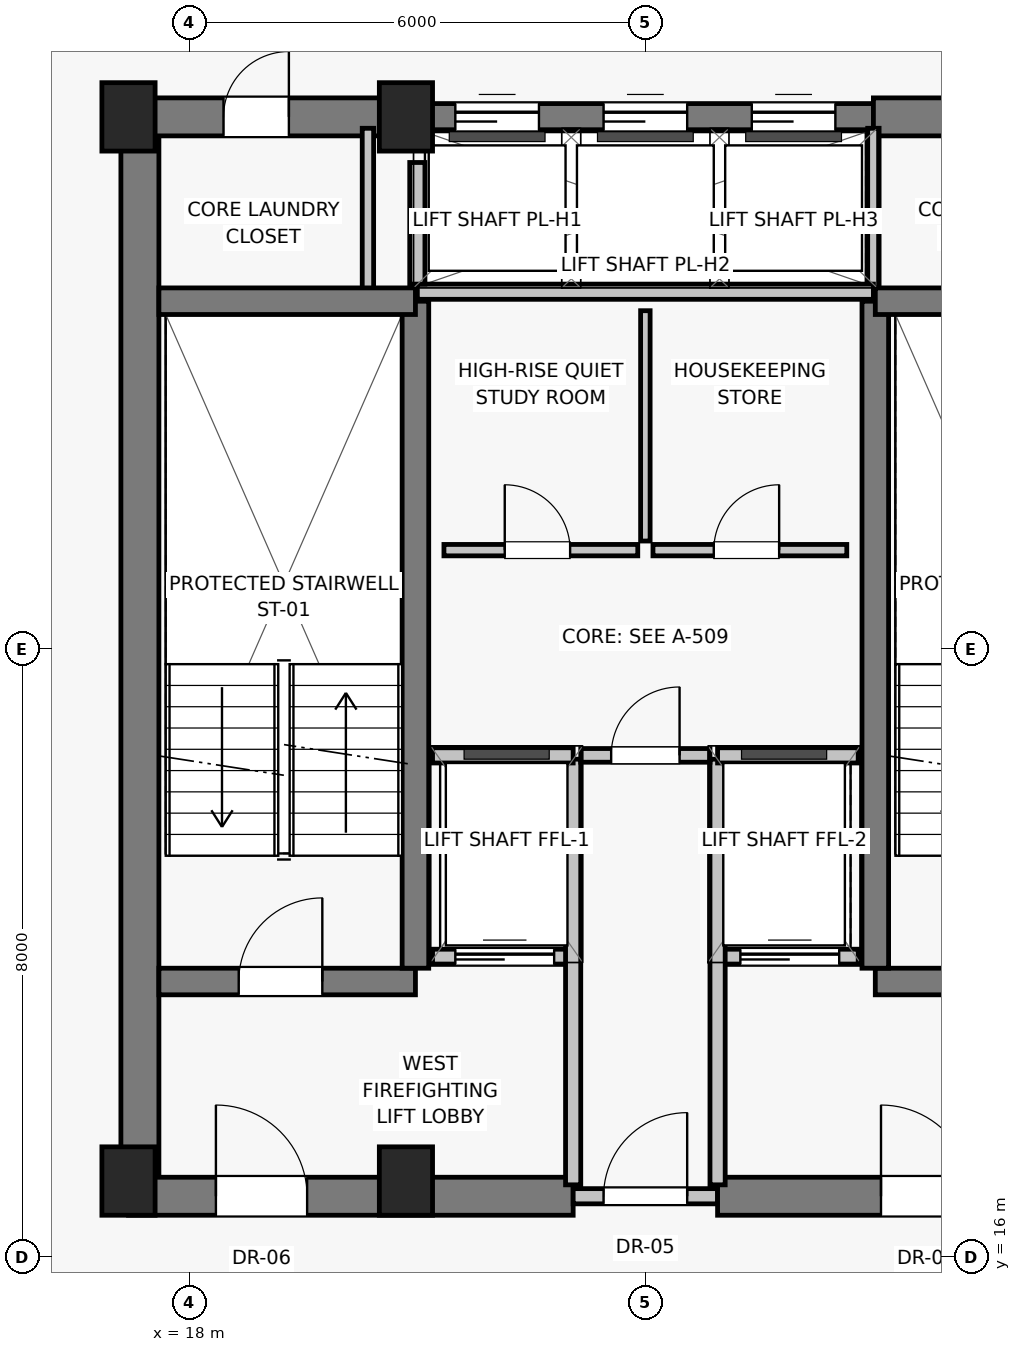
"""IFC4 building model, lengths in metres.
Left out: names, types, materials, properties, quantities, classifications, styles, units other than length and angle.
Written with IfcOpenShell. Run it as: python <this file> out.ifc"""

import sys

from ifc_helpers import new_model, si_unit, direction, frame, frame_2d, origin, origin_2d, place, context, subcontext, project, spatial, rectangle, extrude, source, transform, mapped, element, fill, save


model = new_model("IFC4")
c1 = context("Model", 3, precision=1e-05, world=origin(), true_north=direction((0.0, 1.0)))
c2 = subcontext(c1, "Body", "Model", "MODEL_VIEW")
j1 = project(units=[si_unit("LENGTHUNIT", "METRE"), si_unit("PLANEANGLEUNIT", "RADIAN")], contexts=[c1])
p1 = place(None, origin())
s1 = spatial("IfcSite", under=j1, at=p1, CompositionType="ELEMENT")
p2 = place(p1, origin())
s2 = spatial("IfcBuilding", under=s1, at=p2, CompositionType="ELEMENT")
p3 = place(p2, frame((0.0, 0.0, 215.65)))
s3 = spatial("IfcBuildingStorey", under=s2, at=p3, CompositionType="ELEMENT", Elevation=215.65)
for number, where, z_axis, x_axis in (
    (1, (17.2, 17.0, 0.0), (0.0, 0.0, 1.0), (1.0, 0.0, 0.0)),
    (2, (20.85, 17.0, 0.0), (0.0, 0.0, 1.0), (1.0, 0.0, 0.0)),
    (3, (17.2, 31.0, 0.0), (0.0, 0.0, 1.0), (1.0, 0.0, 0.0)),
    (4, (20.85, 31.0, 0.0), (0.0, 0.0, 1.0), (1.0, 0.0, 0.0)),
):
    element("IfcColumn", number, at=place(p3, frame(where, z_axis=z_axis, x_axis=x_axis)), inside=s3, PredefinedType="PILASTER", context=c2, shape_type="SweptSolid", body=[
        extrude(rectangle(XDim=0.7, YDim=0.9, at=origin_2d()), origin(), (0.0, 0.0, 1.0), 3.25),
    ])
p4 = place(p3, frame((17.35, 16.8, 0.0), z_axis=(0.0, 0.0, 1.0), x_axis=(0.0, 1.0, 0.0)))
e5 = element("IfcWall", 5, at=p4, inside=s3, PredefinedType="SHEAR", context=c2, shape_type="SweptSolid", body=[
    extrude(rectangle(XDim=14.2, YDim=0.5, at=frame_2d((7.1, 0.0))), origin(), (0.0, 0.0, 1.0), 3.015),
])
p5 = place(p3, frame((17.2, 16.8, 0.0), z_axis=(0.0, 0.0, 1.0), x_axis=(1.0, 0.0, 0.0)))
e6 = element("IfcWall", 6, at=p5, inside=s3, PredefinedType="SHEAR", context=c2, shape_type="SweptSolid", body=[
    extrude(rectangle(XDim=5.85, YDim=0.5, at=frame_2d((2.925, 0.0))), origin(), (0.0, 0.0, 1.0), 3.015),
])
p6 = place(p5, frame((1.15, 0.0, 0.0)))
e7 = element("IfcOpeningElement", 7, at=p6, cuts=e6, PredefinedType="OPENING", context=c2, shape_type="SweptSolid", body=[
    extrude(rectangle(XDim=1.2, YDim=2.03, at=frame_2d((0.6, 1.015))), frame((0.0, 0.26, 0.0), z_axis=(0.0, -1.0, 0.0), x_axis=(1.0, 0.0, 0.0)), (0.0, 0.0, 1.0), 0.52),
])
p7 = place(p3, frame((23.05, 16.8, 0.0), z_axis=(0.0, 0.0, 1.0), x_axis=(1.0, 0.0, 0.0)))
e8 = element("IfcWall", 8, at=p7, inside=s3, PredefinedType="SOLIDWALL", context=c2, shape_type="SweptSolid", body=[
    extrude(rectangle(XDim=1.9, YDim=0.2, at=frame_2d((0.95, 0.0))), origin(), (0.0, 0.0, 1.0), 2.165),
])
p8 = place(p7, frame((0.4, 0.0, 0.0)))
e9 = element("IfcOpeningElement", 9, at=p8, cuts=e8, PredefinedType="OPENING", context=c2, shape_type="SweptSolid", body=[
    extrude(rectangle(XDim=1.1, YDim=2.03, at=frame_2d((0.55, 1.015))), frame((0.0, 0.11, 0.0), z_axis=(0.0, -1.0, 0.0), x_axis=(1.0, 0.0, 0.0)), (0.0, 0.0, 1.0), 0.22),
])
p9 = place(p3, frame((24.95, 16.8, 0.0), z_axis=(0.0, 0.0, 1.0), x_axis=(1.0, 0.0, 0.0)))
e10 = element("IfcWall", 10, at=p9, inside=s3, PredefinedType="SHEAR", context=c2, shape_type="SweptSolid", body=[
    extrude(rectangle(XDim=5.85, YDim=0.5, at=frame_2d((2.925, 0.0))), origin(), (0.0, 0.0, 1.0), 3.015),
])
p10 = place(p9, frame((2.15, 0.0, 0.0)))
e11 = element("IfcOpeningElement", 11, at=p10, cuts=e10, PredefinedType="OPENING", context=c2, shape_type="SweptSolid", body=[
    extrude(rectangle(XDim=1.2, YDim=2.03, at=frame_2d((0.6, 1.015))), frame((0.0, 0.26, 0.0), z_axis=(0.0, -1.0, 0.0), x_axis=(1.0, 0.0, 0.0)), (0.0, 0.0, 1.0), 0.52),
])
p11 = place(p3, frame((17.2, 31.0, 0.0), z_axis=(0.0, 0.0, 1.0), x_axis=(1.0, 0.0, 0.0)))
e12 = element("IfcWall", 12, at=p11, inside=s3, PredefinedType="SHEAR", context=c2, shape_type="SweptSolid", body=[
    extrude(rectangle(XDim=3.8, YDim=0.5, at=frame_2d((1.9, 0.0))), origin(), (0.0, 0.0, 1.0), 3.015),
])
p12 = place(p11, frame((1.25, 0.0, 0.0)))
e13 = element("IfcOpeningElement", 13, at=p12, cuts=e12, PredefinedType="OPENING", context=c2, shape_type="SweptSolid", body=[
    extrude(rectangle(XDim=0.86, YDim=2.01, at=frame_2d((0.43, 1.005))), frame((0.0, 0.26, 0.0), z_axis=(0.0, -1.0, 0.0), x_axis=(1.0, 0.0, 0.0)), (0.0, 0.0, 1.0), 0.52),
])
p13 = place(p3, frame((21.0, 31.0, 0.0), z_axis=(0.0, 0.0, 1.0), x_axis=(1.0, 0.0, 0.0)))
e14 = element("IfcWall", 14, at=p13, inside=s3, PredefinedType="SHEAR", context=c2, shape_type="SweptSolid", body=[
    extrude(rectangle(XDim=6.0, YDim=0.35, at=frame_2d((3.0, 0.0))), origin(), (0.0, 0.0, 1.0), 3.015),
])
p14 = place(p13, frame((0.5, 0.0, 0.0)))
e15 = element("IfcOpeningElement", 15, at=p14, cuts=e14, PredefinedType="OPENING", context=c2, shape_type="SweptSolid", body=[
    extrude(rectangle(XDim=1.1, YDim=2.08, at=frame_2d((0.55, 1.04))), frame((0.0, 0.185, 0.0), z_axis=(0.0, -1.0, 0.0), x_axis=(1.0, 0.0, 0.0)), (0.0, 0.0, 1.0), 0.37),
])
p15 = place(p13, frame((2.45, 0.0, 0.0)))
e16 = element("IfcOpeningElement", 16, at=p15, cuts=e14, PredefinedType="OPENING", context=c2, shape_type="SweptSolid", body=[
    extrude(rectangle(XDim=1.1, YDim=2.08, at=frame_2d((0.55, 1.04))), frame((0.0, 0.185, 0.0), z_axis=(0.0, -1.0, 0.0), x_axis=(1.0, 0.0, 0.0)), (0.0, 0.0, 1.0), 0.37),
])
p16 = place(p13, frame((4.4, 0.0, 0.0)))
e17 = element("IfcOpeningElement", 17, at=p16, cuts=e14, PredefinedType="OPENING", context=c2, shape_type="SweptSolid", body=[
    extrude(rectangle(XDim=1.1, YDim=2.08, at=frame_2d((0.55, 1.04))), frame((0.0, 0.185, 0.0), z_axis=(0.0, -1.0, 0.0), x_axis=(1.0, 0.0, 0.0)), (0.0, 0.0, 1.0), 0.37),
])
p17 = place(p3, frame((27.0, 31.0, 0.0), z_axis=(0.0, 0.0, 1.0), x_axis=(1.0, 0.0, 0.0)))
e18 = element("IfcWall", 18, at=p17, inside=s3, PredefinedType="SHEAR", context=c2, shape_type="SweptSolid", body=[
    extrude(rectangle(XDim=3.8, YDim=0.5, at=frame_2d((1.9, 0.0))), origin(), (0.0, 0.0, 1.0), 3.015),
])
p18 = place(p17, frame((1.15, 0.0, 0.0)))
e19 = element("IfcOpeningElement", 19, at=p18, cuts=e18, PredefinedType="OPENING", context=c2, shape_type="SweptSolid", body=[
    extrude(rectangle(XDim=1.0, YDim=2.01, at=frame_2d((0.5, 1.005))), frame((0.0, 0.26, 0.0), z_axis=(0.0, -1.0, 0.0), x_axis=(1.0, 0.0, 0.0)), (0.0, 0.0, 1.0), 0.52),
])
for number, where, z_axis, x_axis in (
    (20, (20.35, 28.65, 0.0), (0.0, 0.0, 1.0), (0.0, 1.0, 0.0)),
    (21, (27.0, 28.65, 0.0), (0.0, 0.0, 1.0), (0.0, 1.0, 0.0)),
):
    element("IfcWall", number, at=place(p3, frame(where, z_axis=z_axis, x_axis=x_axis)), inside=s3, PredefinedType="PARTITIONING", context=c2, shape_type="SweptSolid", body=[
        extrude(rectangle(XDim=2.2, YDim=0.15, at=frame_2d((1.1, 0.0))), origin(), (0.0, 0.0, 1.0), 3.015),
    ])
p19 = place(p3, frame((17.6, 19.625, 0.0), z_axis=(0.0, 0.0, 1.0), x_axis=(1.0, 0.0, 0.0)))
e22 = element("IfcWall", 22, at=p19, inside=s3, PredefinedType="SHEAR", context=c2, shape_type="SweptSolid", body=[
    extrude(rectangle(XDim=3.375, YDim=0.35, at=frame_2d((1.688, 0.0))), origin(), (0.0, 0.0, 1.0), 3.015),
])
p20 = place(p19, frame((1.05, 0.0, 0.0)))
e23 = element("IfcOpeningElement", 23, at=p20, cuts=e22, PredefinedType="OPENING", context=c2, shape_type="SweptSolid", body=[
    extrude(rectangle(XDim=1.1, YDim=2.03, at=frame_2d((0.55, 1.015))), frame((0.0, 0.185, 0.0), z_axis=(0.0, -1.0, 0.0), x_axis=(1.0, 0.0, 0.0)), (0.0, 0.0, 1.0), 0.37),
])
p21 = place(p3, frame((21.2, 19.95, 0.0), z_axis=(0.0, 0.0, 1.0), x_axis=(1.0, 0.0, 0.0)))
e24 = element("IfcWall", 24, at=p21, inside=s3, PredefinedType="SOLIDWALL", context=c2, shape_type="SweptSolid", body=[
    extrude(rectangle(XDim=1.85, YDim=0.2, at=frame_2d((0.925, 0.0))), origin(), (0.0, 0.0, 1.0), 3.015),
])
p22 = place(p21, frame((0.3, 0.0, 0.0)))
e25 = element("IfcOpeningElement", 25, at=p22, cuts=e24, PredefinedType="OPENING", context=c2, shape_type="SweptSolid", body=[
    extrude(rectangle(XDim=1.3, YDim=2.25, at=frame_2d((0.65, 1.125))), frame((0.0, 0.11, 0.0), z_axis=(0.0, -1.0, 0.0), x_axis=(1.0, 0.0, 0.0)), (0.0, 0.0, 1.0), 0.22),
])
p23 = place(p3, frame((24.95, 19.95, 0.0), z_axis=(0.0, 0.0, 1.0), x_axis=(1.0, 0.0, 0.0)))
e26 = element("IfcWall", 26, at=p23, inside=s3, PredefinedType="SOLIDWALL", context=c2, shape_type="SweptSolid", body=[
    extrude(rectangle(XDim=1.85, YDim=0.2, at=frame_2d((0.925, 0.0))), origin(), (0.0, 0.0, 1.0), 3.015),
])
p24 = place(p23, frame((0.3, 0.0, 0.0)))
e27 = element("IfcOpeningElement", 27, at=p24, cuts=e26, PredefinedType="OPENING", context=c2, shape_type="SweptSolid", body=[
    extrude(rectangle(XDim=1.3, YDim=2.25, at=frame_2d((0.65, 1.125))), frame((0.0, 0.11, 0.0), z_axis=(0.0, -1.0, 0.0), x_axis=(1.0, 0.0, 0.0)), (0.0, 0.0, 1.0), 0.22),
])
p25 = place(p3, frame((27.025, 19.625, 0.0), z_axis=(0.0, 0.0, 1.0), x_axis=(1.0, 0.0, 0.0)))
e28 = element("IfcWall", 28, at=p25, inside=s3, PredefinedType="SHEAR", context=c2, shape_type="SweptSolid", body=[
    extrude(rectangle(XDim=3.375, YDim=0.35, at=frame_2d((1.688, 0.0))), origin(), (0.0, 0.0, 1.0), 3.015),
])
p26 = place(p25, frame((1.05, 0.0, 0.0)))
e29 = element("IfcOpeningElement", 29, at=p26, cuts=e28, PredefinedType="OPENING", context=c2, shape_type="SweptSolid", body=[
    extrude(rectangle(XDim=1.1, YDim=2.03, at=frame_2d((0.55, 1.015))), frame((0.0, 0.185, 0.0), z_axis=(0.0, -1.0, 0.0), x_axis=(1.0, 0.0, 0.0)), (0.0, 0.0, 1.0), 0.37),
])
for number, where, z_axis, x_axis in (
    (30, (20.975, 19.8, 0.0), (0.0, 0.0, 1.0), (0.0, 1.0, 0.0)),
    (31, (27.025, 19.8, 0.0), (0.0, 0.0, 1.0), (0.0, 1.0, 0.0)),
):
    element("IfcWall", number, at=place(p3, frame(where, z_axis=z_axis, x_axis=x_axis)), inside=s3, PredefinedType="SHEAR", context=c2, shape_type="SweptSolid", body=[
        extrude(rectangle(XDim=8.775, YDim=0.35, at=frame_2d((4.387, 0.0))), origin(), (0.0, 0.0, 1.0), 3.015),
    ])
for number, where, z_axis, x_axis in (
    (32, (17.6, 28.575, 0.0), (0.0, 0.0, 1.0), (1.0, 0.0, 0.0)),
    (33, (27.025, 28.575, 0.0), (0.0, 0.0, 1.0), (1.0, 0.0, 0.0)),
):
    element("IfcWall", number, at=place(p3, frame(where, z_axis=z_axis, x_axis=x_axis)), inside=s3, PredefinedType="SHEAR", context=c2, shape_type="SweptSolid", body=[
        extrude(rectangle(XDim=3.375, YDim=0.35, at=frame_2d((1.688, 0.0))), origin(), (0.0, 0.0, 1.0), 3.015),
    ])
for number, where, z_axis, x_axis in (
    (34, (23.05, 16.95, 0.0), (0.0, 0.0, 1.0), (0.0, 1.0, 0.0)),
    (35, (24.95, 16.95, 0.0), (0.0, 0.0, 1.0), (0.0, 1.0, 0.0)),
):
    element("IfcWall", number, at=place(p3, frame(where, z_axis=z_axis, x_axis=x_axis)), inside=s3, PredefinedType="SOLIDWALL", context=c2, shape_type="SweptSolid", body=[
        extrude(rectangle(XDim=5.6, YDim=0.2, at=frame_2d((2.8, 0.0))), origin(), (0.0, 0.0, 1.0), 3.015),
    ])
for number, where, z_axis, x_axis in (
    (36, (21.2, 22.6, 0.0), (0.0, 0.0, 1.0), (1.0, 0.0, 0.0)),
    (37, (24.95, 22.6, 0.0), (0.0, 0.0, 1.0), (1.0, 0.0, 0.0)),
):
    element("IfcWall", number, at=place(p3, frame(where, z_axis=z_axis, x_axis=x_axis)), inside=s3, PredefinedType="SOLIDWALL", context=c2, shape_type="SweptSolid", body=[
        extrude(rectangle(XDim=1.85, YDim=0.2, at=frame_2d((0.925, 0.0))), origin(), (0.0, 0.0, 1.0), 3.015),
    ])
p27 = place(p3, frame((21.0, 28.7, 0.0), z_axis=(0.0, 0.0, 1.0), x_axis=(1.0, 0.0, 0.0)))
e38 = element("IfcWall", 38, at=p27, inside=s3, PredefinedType="SOLIDWALL", context=c2, shape_type="SweptSolid", body=[
    extrude(rectangle(XDim=6.0, YDim=0.2, at=frame_2d((3.0, 0.0))), origin(), (0.0, 0.0, 1.0), 3.015),
])
p28 = place(p3, frame((21.0, 28.8, 0.0), z_axis=(0.0, 0.0, 1.0), x_axis=(0.0, 1.0, 0.0)))
e39 = element("IfcWall", 39, at=p28, inside=s3, PredefinedType="SOLIDWALL", context=c2, shape_type="SweptSolid", body=[
    extrude(rectangle(XDim=1.6, YDim=0.2, at=frame_2d((0.8, 0.0))), origin(), (0.0, 0.0, 1.0), 3.015),
])
p29 = place(p3, frame((23.15, 22.6, 0.0), z_axis=(0.0, 0.0, 1.0), x_axis=(1.0, 0.0, 0.0)))
e40 = element("IfcWall", 40, at=p29, inside=s3, PredefinedType="PARTITIONING", context=c2, shape_type="SweptSolid", body=[
    extrude(rectangle(XDim=1.7, YDim=0.18, at=frame_2d((0.85, 0.0))), origin(), (0.0, 0.0, 1.0), 3.015),
])
p30 = place(p29, frame((0.4, 0.0, 0.0)))
e41 = element("IfcOpeningElement", 41, at=p30, cuts=e40, PredefinedType="OPENING", context=c2, shape_type="SweptSolid", body=[
    extrude(rectangle(XDim=0.9, YDim=2.01, at=frame_2d((0.45, 1.005))), frame((0.0, 0.1, 0.0), z_axis=(0.0, -1.0, 0.0), x_axis=(1.0, 0.0, 0.0)), (0.0, 0.0, 1.0), 0.2),
])
p31 = place(p3, frame((21.35, 25.3, 0.0), z_axis=(0.0, 0.0, 1.0), x_axis=(1.0, 0.0, 0.0)))
e42 = element("IfcWall", 42, at=p31, inside=s3, PredefinedType="PARTITIONING", context=c2, shape_type="SweptSolid", body=[
    extrude(rectangle(XDim=2.55, YDim=0.15, at=frame_2d((1.275, 0.0))), origin(), (0.0, 0.0, 1.0), 3.015),
])
p32 = place(p31, frame((0.8, 0.0, 0.0)))
e43 = element("IfcOpeningElement", 43, at=p32, cuts=e42, PredefinedType="OPENING", context=c2, shape_type="SweptSolid", body=[
    extrude(rectangle(XDim=0.86, YDim=2.01, at=frame_2d((0.43, 1.005))), frame((0.0, 0.085, 0.0), z_axis=(0.0, -1.0, 0.0), x_axis=(1.0, 0.0, 0.0)), (0.0, 0.0, 1.0), 0.17),
])
p33 = place(p3, frame((24.1, 25.3, 0.0), z_axis=(0.0, 0.0, 1.0), x_axis=(1.0, 0.0, 0.0)))
e44 = element("IfcWall", 44, at=p33, inside=s3, PredefinedType="PARTITIONING", context=c2, shape_type="SweptSolid", body=[
    extrude(rectangle(XDim=2.55, YDim=0.15, at=frame_2d((1.275, 0.0))), origin(), (0.0, 0.0, 1.0), 3.015),
])
p34 = place(p33, frame((0.8, 0.0, 0.0)))
e45 = element("IfcOpeningElement", 45, at=p34, cuts=e44, PredefinedType="OPENING", context=c2, shape_type="SweptSolid", body=[
    extrude(rectangle(XDim=0.86, YDim=2.01, at=frame_2d((0.43, 1.005))), frame((0.0, 0.085, 0.0), z_axis=(0.0, -1.0, 0.0), x_axis=(1.0, 0.0, 0.0)), (0.0, 0.0, 1.0), 0.17),
])
p35 = place(p3, frame((24.0, 25.42, 0.0), z_axis=(0.0, 0.0, 1.0), x_axis=(0.0, 1.0, 0.0)))
e46 = element("IfcWall", 46, at=p35, inside=s3, PredefinedType="PARTITIONING", context=c2, shape_type="SweptSolid", body=[
    extrude(rectangle(XDim=3.03, YDim=0.125, at=frame_2d((1.515, 0.0))), origin(), (0.0, 0.0, 1.0), 3.015),
])
m1 = source(origin(), c2, "Body", "SweptSolid", [
    extrude(rectangle(XDim=1.2, YDim=2.03, at=frame_2d((0.6, 1.015))), frame((0.0, 0.025, 0.0), z_axis=(0.0, -1.0, 0.0), x_axis=(1.0, 0.0, 0.0)), (0.0, 0.0, 1.0), 0.05),
])
p36 = place(p6, origin())
e47 = element("IfcDoor", 47, at=p36, inside=s3, OperationType="SINGLE_SWING_LEFT", PredefinedType="DOOR", context=c2, shape_type="MappedRepresentation", body=[
    mapped(m1, transform((0.0, 0.0, 0.0), scale=1.0)),
])
fill(e7, e47)
m2 = source(origin(), c2, "Body", "SweptSolid", [
    extrude(rectangle(XDim=1.1, YDim=2.03, at=frame_2d((0.55, 1.015))), frame((0.0, 0.025, 0.0), z_axis=(0.0, -1.0, 0.0), x_axis=(1.0, 0.0, 0.0)), (0.0, 0.0, 1.0), 0.05),
])
p37 = place(p8, origin())
e48 = element("IfcDoor", 48, at=p37, inside=s3, OperationType="SINGLE_SWING_RIGHT", PredefinedType="DOOR", context=c2, shape_type="MappedRepresentation", body=[
    mapped(m2, transform((0.0, 0.0, 0.0), scale=1.0)),
])
fill(e9, e48)
p38 = place(p10, origin())
e49 = element("IfcDoor", 49, at=p38, inside=s3, OperationType="SINGLE_SWING_LEFT", PredefinedType="DOOR", context=c2, shape_type="MappedRepresentation", body=[
    mapped(m1, transform((0.0, 0.0, 0.0), scale=1.0)),
])
fill(e11, e49)
m3 = source(origin(), c2, "Body", "SweptSolid", [
    extrude(rectangle(XDim=0.86, YDim=2.01, at=frame_2d((0.43, 1.005))), frame((0.0, 0.025, 0.0), z_axis=(0.0, -1.0, 0.0), x_axis=(1.0, 0.0, 0.0)), (0.0, 0.0, 1.0), 0.05),
])
p39 = place(p12, origin())
e50 = element("IfcDoor", 50, at=p39, inside=s3, OperationType="SINGLE_SWING_RIGHT", PredefinedType="DOOR", context=c2, shape_type="MappedRepresentation", body=[
    mapped(m3, transform((0.0, 0.0, 0.0), scale=1.0)),
])
fill(e13, e50)
m4 = source(origin(), c2, "Body", "SweptSolid", [
    extrude(rectangle(XDim=1.1, YDim=2.08, at=frame_2d((0.55, 1.04))), frame((0.0, 0.025, 0.0), z_axis=(0.0, -1.0, 0.0), x_axis=(1.0, 0.0, 0.0)), (0.0, 0.0, 1.0), 0.05),
])
p40 = place(p14, origin())
e51 = element("IfcDoor", 51, at=p40, inside=s3, OperationType="SLIDING_TO_LEFT", PredefinedType="DOOR", context=c2, shape_type="MappedRepresentation", body=[
    mapped(m4, transform((0.0, 0.0, 0.0), scale=1.0)),
])
fill(e15, e51)
p41 = place(p15, origin())
e52 = element("IfcDoor", 52, at=p41, inside=s3, OperationType="SLIDING_TO_LEFT", PredefinedType="DOOR", context=c2, shape_type="MappedRepresentation", body=[
    mapped(m4, transform((0.0, 0.0, 0.0), scale=1.0)),
])
fill(e16, e52)
p42 = place(p16, origin())
e53 = element("IfcDoor", 53, at=p42, inside=s3, OperationType="SLIDING_TO_LEFT", PredefinedType="DOOR", context=c2, shape_type="MappedRepresentation", body=[
    mapped(m4, transform((0.0, 0.0, 0.0), scale=1.0)),
])
fill(e17, e53)
p43 = place(p20, origin())
e54 = element("IfcDoor", 54, at=p43, inside=s3, OperationType="SINGLE_SWING_RIGHT", PredefinedType="DOOR", context=c2, shape_type="MappedRepresentation", body=[
    mapped(m2, transform((0.0, 0.0, 0.0), scale=1.0)),
])
fill(e23, e54)
m5 = source(origin(), c2, "Body", "SweptSolid", [
    extrude(rectangle(XDim=1.3, YDim=2.25, at=frame_2d((0.65, 1.125))), frame((0.0, 0.025, 0.0), z_axis=(0.0, -1.0, 0.0), x_axis=(1.0, 0.0, 0.0)), (0.0, 0.0, 1.0), 0.05),
])
p44 = place(p22, origin())
e55 = element("IfcDoor", 55, at=p44, inside=s3, OperationType="SLIDING_TO_LEFT", PredefinedType="DOOR", context=c2, shape_type="MappedRepresentation", body=[
    mapped(m5, transform((0.0, 0.0, 0.0), scale=1.0)),
])
fill(e25, e55)
p45 = place(p24, origin())
e56 = element("IfcDoor", 56, at=p45, inside=s3, OperationType="SLIDING_TO_LEFT", PredefinedType="DOOR", context=c2, shape_type="MappedRepresentation", body=[
    mapped(m5, transform((0.0, 0.0, 0.0), scale=1.0)),
])
fill(e27, e56)
m6 = source(origin(), c2, "Body", "SweptSolid", [
    extrude(rectangle(XDim=0.9, YDim=2.01, at=frame_2d((0.45, 1.005))), frame((0.0, 0.025, 0.0), z_axis=(0.0, -1.0, 0.0), x_axis=(1.0, 0.0, 0.0)), (0.0, 0.0, 1.0), 0.05),
])
p46 = place(p30, origin())
e57 = element("IfcDoor", 57, at=p46, inside=s3, OperationType="SINGLE_SWING_RIGHT", PredefinedType="DOOR", context=c2, shape_type="MappedRepresentation", body=[
    mapped(m6, transform((0.0, 0.0, 0.0), scale=1.0)),
])
fill(e41, e57)
p47 = place(p32, origin())
e58 = element("IfcDoor", 58, at=p47, inside=s3, OperationType="SINGLE_SWING_LEFT", PredefinedType="DOOR", context=c2, shape_type="MappedRepresentation", body=[
    mapped(m3, transform((0.0, 0.0, 0.0), scale=1.0)),
])
fill(e43, e58)
p48 = place(p34, origin())
e59 = element("IfcDoor", 59, at=p48, inside=s3, OperationType="SINGLE_SWING_RIGHT", PredefinedType="DOOR", context=c2, shape_type="MappedRepresentation", body=[
    mapped(m3, transform((0.0, 0.0, 0.0), scale=1.0)),
])
fill(e45, e59)
save(model, sys.argv[1])
